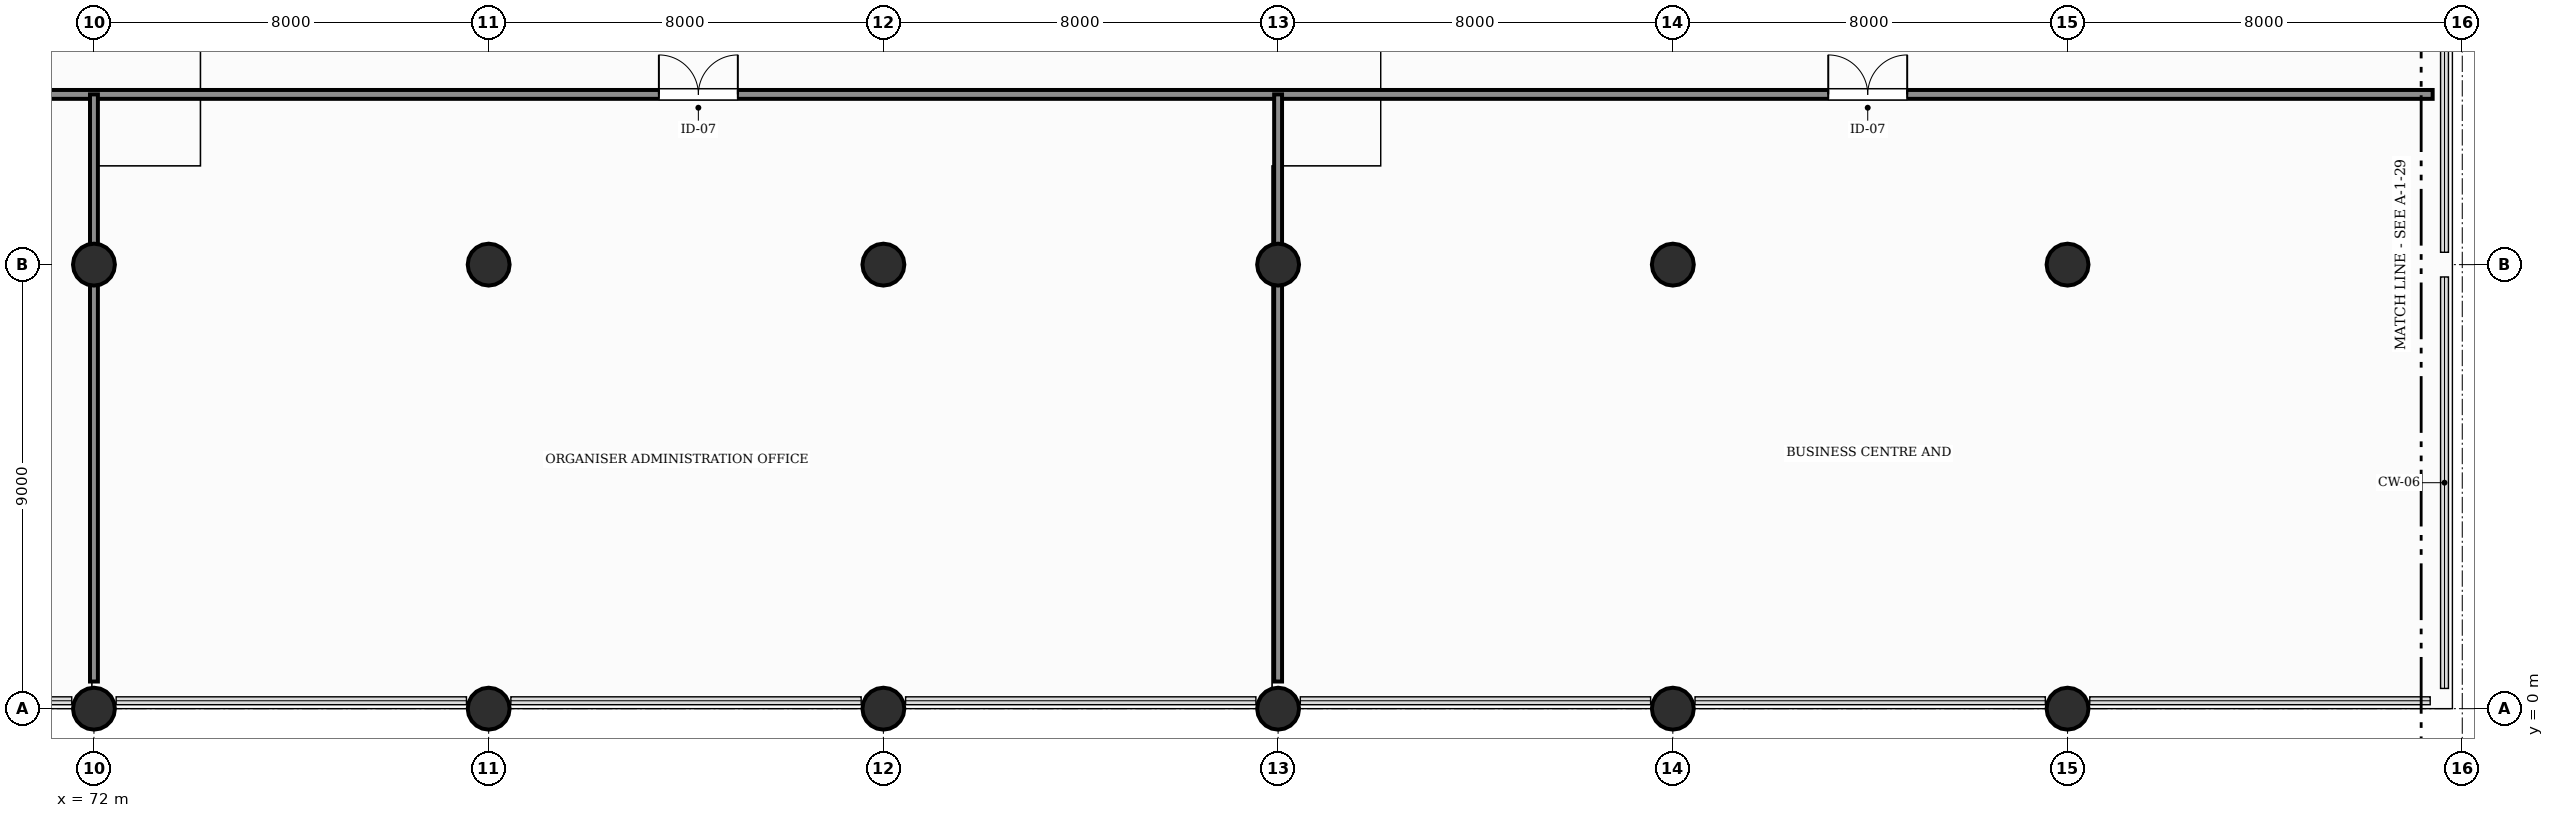
"""IFC4 building model, lengths in metres.
Left out: names, types, materials, properties, quantities, classifications, styles, units other than length and angle.
Written with IfcOpenShell. Run it as: python <this file> out.ifc"""

import sys

from ifc_helpers import new_model, si_unit, direction, frame, frame_2d, origin, origin_2d, place, context, subcontext, project, spatial, rectangle, circle, extrude, element, fill, save


model = new_model("IFC4")
c1 = context("Model", 3, precision=1e-05, world=origin(), true_north=direction((0.0, 1.0)))
c2 = subcontext(c1, "Body", "Model", "MODEL_VIEW")
j1 = project(units=[si_unit("LENGTHUNIT", "METRE"), si_unit("PLANEANGLEUNIT", "RADIAN")], contexts=[c1])
p1 = place(None, origin())
s1 = spatial("IfcSite", under=j1, at=p1, CompositionType="ELEMENT")
p2 = place(p1, origin())
s2 = spatial("IfcBuilding", under=s1, at=p2, CompositionType="ELEMENT")
p3 = place(p2, frame((0.0, 0.0, 11.4)))
s3 = spatial("IfcBuildingStorey", under=s2, at=p3, CompositionType="ELEMENT", Elevation=11.4)
for number, where, z_axis, x_axis in (
    (1, (72.0, 0.0, 0.0), (0.0, 0.0, 1.0), (1.0, 0.0, 0.0)),
    (2, (72.0, 9.0, 0.0), (0.0, 0.0, 1.0), (1.0, 0.0, 0.0)),
    (3, (80.0, 0.0, 0.0), (0.0, 0.0, 1.0), (1.0, 0.0, 0.0)),
    (4, (80.0, 9.0, 0.0), (0.0, 0.0, 1.0), (1.0, 0.0, 0.0)),
    (5, (88.0, 0.0, 0.0), (0.0, 0.0, 1.0), (1.0, 0.0, 0.0)),
    (6, (88.0, 9.0, 0.0), (0.0, 0.0, 1.0), (1.0, 0.0, 0.0)),
    (7, (96.0, 0.0, 0.0), (0.0, 0.0, 1.0), (1.0, 0.0, 0.0)),
    (8, (96.0, 9.0, 0.0), (0.0, 0.0, 1.0), (1.0, 0.0, 0.0)),
    (9, (104.0, 0.0, 0.0), (0.0, 0.0, 1.0), (1.0, 0.0, 0.0)),
    (10, (104.0, 9.0, 0.0), (0.0, 0.0, 1.0), (1.0, 0.0, 0.0)),
    (11, (112.0, 0.0, 0.0), (0.0, 0.0, 1.0), (1.0, 0.0, 0.0)),
    (12, (112.0, 9.0, 0.0), (0.0, 0.0, 1.0), (1.0, 0.0, 0.0)),
):
    element("IfcColumn", number, at=place(p3, frame(where, z_axis=z_axis, x_axis=x_axis)), inside=s3, PredefinedType="COLUMN", context=c2, shape_type="SweptSolid", body=[
        extrude(circle(Radius=0.425, at=origin_2d()), origin(), (0.0, 0.0, 1.0), 4.8),
    ])
p4 = place(p3, frame((0.6, 12.45, 0.0), z_axis=(0.0, 0.0, 1.0), x_axis=(1.0, 0.0, 0.0)))
e13 = element("IfcWall", 13, at=p4, inside=s3, PredefinedType="PARTITIONING", context=c2, shape_type="SweptSolid", body=[
    extrude(rectangle(XDim=118.8, YDim=0.18, at=frame_2d((59.4, 0.0))), origin(), (0.0, 0.0, 1.0), 3.4),
])
p5 = place(p4, frame((11.15, 0.0, 0.0)))
e14 = element("IfcOpeningElement", 14, at=p5, cuts=e13, PredefinedType="OPENING", context=c2, shape_type="SweptSolid", body=[
    extrude(rectangle(XDim=1.6, YDim=2.3, at=frame_2d((0.8, 1.15))), frame((0.0, 0.1, 0.0), z_axis=(0.0, -1.0, 0.0), x_axis=(1.0, 0.0, 0.0)), (0.0, 0.0, 1.0), 0.2),
])
p6 = place(p4, frame((34.85, 0.0, 0.0)))
e15 = element("IfcOpeningElement", 15, at=p6, cuts=e13, PredefinedType="OPENING", context=c2, shape_type="SweptSolid", body=[
    extrude(rectangle(XDim=1.6, YDim=2.3, at=frame_2d((0.8, 1.15))), frame((0.0, 0.1, 0.0), z_axis=(0.0, -1.0, 0.0), x_axis=(1.0, 0.0, 0.0)), (0.0, 0.0, 1.0), 0.2),
])
p7 = place(p4, frame((58.85, 0.0, 0.0)))
e16 = element("IfcOpeningElement", 16, at=p7, cuts=e13, PredefinedType="OPENING", context=c2, shape_type="SweptSolid", body=[
    extrude(rectangle(XDim=1.6, YDim=2.3, at=frame_2d((0.8, 1.15))), frame((0.0, 0.1, 0.0), z_axis=(0.0, -1.0, 0.0), x_axis=(1.0, 0.0, 0.0)), (0.0, 0.0, 1.0), 0.2),
])
p8 = place(p4, frame((82.85, 0.0, 0.0)))
e17 = element("IfcOpeningElement", 17, at=p8, cuts=e13, PredefinedType="OPENING", context=c2, shape_type="SweptSolid", body=[
    extrude(rectangle(XDim=1.6, YDim=2.3, at=frame_2d((0.8, 1.15))), frame((0.0, 0.1, 0.0), z_axis=(0.0, -1.0, 0.0), x_axis=(1.0, 0.0, 0.0)), (0.0, 0.0, 1.0), 0.2),
])
p9 = place(p4, frame((106.55, 0.0, 0.0)))
e18 = element("IfcOpeningElement", 18, at=p9, cuts=e13, PredefinedType="OPENING", context=c2, shape_type="SweptSolid", body=[
    extrude(rectangle(XDim=1.6, YDim=2.3, at=frame_2d((0.8, 1.15))), frame((0.0, 0.1, 0.0), z_axis=(0.0, -1.0, 0.0), x_axis=(1.0, 0.0, 0.0)), (0.0, 0.0, 1.0), 0.2),
])
for number, where, z_axis, x_axis in (
    (19, (72.0, 0.55, 0.0), (0.0, 0.0, 1.0), (0.0, 1.0, 0.0)),
    (20, (96.0, 0.55, 0.0), (0.0, 0.0, 1.0), (0.0, 1.0, 0.0)),
):
    element("IfcWall", number, at=place(p3, frame(where, z_axis=z_axis, x_axis=x_axis)), inside=s3, PredefinedType="PARTITIONING", context=c2, shape_type="SweptSolid", body=[
        extrude(rectangle(XDim=11.9, YDim=0.16, at=frame_2d((5.95, 0.0))), origin(), (0.0, 0.0, 1.0), 3.4),
    ])
p10 = place(p8, origin())
e21 = element("IfcDoor", 21, at=p10, inside=s3, OperationType="DOUBLE_DOOR_SINGLE_SWING", PredefinedType="DOOR", context=c2, shape_type="SweptSolid", body=[
    extrude(rectangle(XDim=1.6, YDim=2.3, at=frame_2d((0.8, 1.15))), frame((0.0, 0.025, 0.0), z_axis=(0.0, -1.0, 0.0), x_axis=(1.0, 0.0, 0.0)), (0.0, 0.0, 1.0), 0.05),
])
fill(e17, e21)
p11 = place(p9, origin())
e22 = element("IfcDoor", 22, at=p11, inside=s3, OperationType="DOUBLE_DOOR_SINGLE_SWING", PredefinedType="DOOR", context=c2, shape_type="SweptSolid", body=[
    extrude(rectangle(XDim=1.6, YDim=2.3, at=frame_2d((0.8, 1.15))), frame((0.0, 0.025, 0.0), z_axis=(0.0, -1.0, 0.0), x_axis=(1.0, 0.0, 0.0)), (0.0, 0.0, 1.0), 0.05),
])
fill(e18, e22)
save(model, sys.argv[1])
